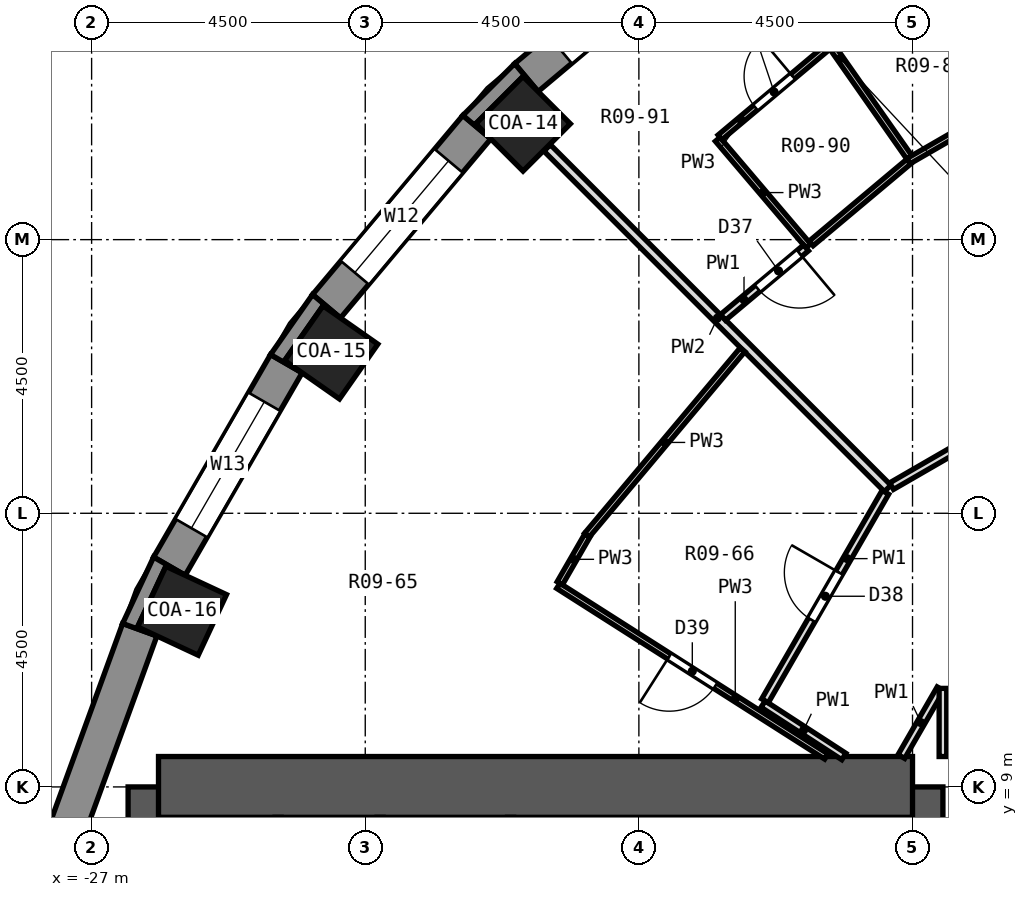
"""IFC4 building model, lengths in metres.
Left out: names, types, materials, properties, quantities, classifications, styles, units other than length and angle.
Written with IfcOpenShell. Run it as: python <this file> out.ifc"""

import sys

from ifc_helpers import new_model, si_unit, direction, frame, frame_2d, origin, origin_2d, place, context, subcontext, project, spatial, polyline, rectangle, outline, extrude, element, fill, save


model = new_model("IFC4")
c1 = context("Model", 3, precision=1e-05, world=origin(), true_north=direction((0.0, 1.0)))
c2 = subcontext(c1, "Body", "Model", "MODEL_VIEW")
j1 = project(units=[si_unit("LENGTHUNIT", "METRE"), si_unit("PLANEANGLEUNIT", "RADIAN")], contexts=[c1])
p1 = place(None, origin())
s1 = spatial("IfcSite", under=j1, at=p1, CompositionType="ELEMENT")
p2 = place(p1, origin())
s2 = spatial("IfcBuilding", under=s1, at=p2, CompositionType="ELEMENT")
p3 = place(p2, frame((0.0, 0.0, 26.3)))
s3 = spatial("IfcBuildingStorey", under=s2, at=p3, CompositionType="ELEMENT", Elevation=26.3)
p4 = place(p3, frame((-19.905, 19.905, 0.0), z_axis=(0.0, 0.0, 1.0), x_axis=(-0.707106781187, 0.707106781187, 0.0)))
e1 = element("IfcColumn", 1, at=p4, inside=s3, PredefinedType="COLUMN", context=c2, shape_type="SweptSolid", body=[
    extrude(rectangle(XDim=1.1, YDim=1.1, at=origin_2d()), origin(), (0.0, 0.0, 1.0), 3.3),
])
p5 = place(p3, frame((-23.059, 16.146, -0.55), z_axis=(0.0, 0.0, 1.0), x_axis=(-0.819152044289, 0.573576436351, 0.0)))
e2 = element("IfcColumn", 2, at=p5, inside=s3, PredefinedType="COLUMN", context=c2, shape_type="SweptSolid", body=[
    extrude(rectangle(XDim=1.1, YDim=1.1, at=origin_2d()), origin(), (0.0, 0.0, 1.0), 3.85),
])
p6 = place(p3, frame((-25.512, 11.897, 0.0), z_axis=(0.0, 0.0, 1.0), x_axis=(-0.906307787037, 0.422618261741, 0.0)))
e3 = element("IfcColumn", 3, at=p6, inside=s3, PredefinedType="COLUMN", context=c2, shape_type="SweptSolid", body=[
    extrude(rectangle(XDim=1.1, YDim=1.1, at=origin_2d()), origin(), (0.0, 0.0, 1.0), 3.3),
])
p7 = place(p3, frame((-13.5, -9.0, 0.0), z_axis=(0.0, 0.0, 1.0), x_axis=(0.0, 1.0, 0.0)))
e4 = element("IfcWall", 4, at=p7, inside=s3, PredefinedType="SHEAR", context=c2, shape_type="SweptSolid", body=[
    extrude(rectangle(XDim=18.0, YDim=1.0, at=frame_2d((9.0, 0.0))), origin(), (0.0, 0.0, 1.0), 3.3),
])
p8 = place(p7, frame((15.4, 0.0, 0.0)))
e5 = element("IfcOpeningElement", 5, at=p8, cuts=e4, PredefinedType="OPENING", context=c2, shape_type="SweptSolid", body=[
    extrude(rectangle(XDim=1.2, YDim=2.1, at=frame_2d((0.6, 1.05))), frame((0.0, 0.512, 0.0), z_axis=(0.0, -1.0, 0.0), x_axis=(1.0, 0.0, 0.0)), (0.0, 0.0, 1.0), 1.024),
])
p9 = place(p7, frame((1.4, 0.0, 0.0)))
e6 = element("IfcOpeningElement", 6, at=p9, cuts=e4, PredefinedType="OPENING", context=c2, shape_type="SweptSolid", body=[
    extrude(rectangle(XDim=1.2, YDim=2.1, at=frame_2d((0.6, 1.05))), frame((0.0, 0.512, 0.0), z_axis=(0.0, -1.0, 0.0), x_axis=(1.0, 0.0, 0.0)), (0.0, 0.0, 1.0), 1.024),
])
p10 = place(p7, frame((7.5, 0.0, 0.0)))
e7 = element("IfcOpeningElement", 7, at=p10, cuts=e4, PredefinedType="OPENING", context=c2, shape_type="SweptSolid", body=[
    extrude(rectangle(XDim=3.0, YDim=2.4, at=frame_2d((1.5, 1.2))), frame((0.0, 0.512, 0.0), z_axis=(0.0, -1.0, 0.0), x_axis=(1.0, 0.0, 0.0)), (0.0, 0.0, 1.0), 1.024),
])
p11 = place(p3, frame((-25.9, -9.0, 0.0), z_axis=(0.0, 0.0, 1.0), x_axis=(0.0, 1.0, 0.0)))
e8 = element("IfcWall", 8, at=p11, inside=s3, PredefinedType="SHEAR", context=c2, shape_type="SweptSolid", body=[
    extrude(rectangle(XDim=18.0, YDim=1.0, at=frame_2d((9.0, 0.0))), origin(), (0.0, 0.0, 1.0), 3.3),
])
p12 = place(p3, frame((-13.5, 9.0, 0.0), z_axis=(0.0, 0.0, 1.0), x_axis=(-1.0, 0.0, 0.0)))
e9 = element("IfcWall", 9, at=p12, inside=s3, PredefinedType="SHEAR", context=c2, shape_type="SweptSolid", body=[
    extrude(rectangle(XDim=12.4, YDim=1.0, at=frame_2d((6.2, 0.0))), origin(), (0.0, 0.0, 1.0), 3.3),
])
p13 = place(p3, frame((-16.904, 23.137, 0.0), z_axis=(0.0, 0.0, 1.0), x_axis=(-0.766026164483, -0.642809392687, 0.0)))
e10 = element("IfcWall", 10, at=p13, inside=s3, PredefinedType="SOLIDWALL", context=c2, shape_type="SweptSolid", body=[
    extrude(rectangle(XDim=3.846, YDim=0.6, at=frame_2d((1.923, 0.0))), origin(), (0.0, 0.0, 1.0), 2.75),
])
p14 = place(p13, frame((0.723, 0.0, 0.9)))
e11 = element("IfcOpeningElement", 11, at=p14, cuts=e10, PredefinedType="OPENING", context=c2, shape_type="SweptSolid", body=[
    extrude(rectangle(XDim=2.4, YDim=1.8, at=frame_2d((1.2, 0.9))), frame((0.0, 0.312, 0.0), z_axis=(0.0, -1.0, 0.0), x_axis=(1.0, 0.0, 0.0)), (0.0, 0.0, 1.0), 0.624),
])
p15 = place(p3, frame((-20.665, 19.85, 0.0), z_axis=(0.0, 0.0, 1.0), x_axis=(-0.642809392687, -0.766026164483, 0.0)))
e12 = element("IfcWall", 12, at=p15, inside=s3, PredefinedType="SOLIDWALL", context=c2, shape_type="SweptSolid", body=[
    extrude(rectangle(XDim=3.846, YDim=0.6, at=frame_2d((1.923, 0.0))), origin(), (0.0, 0.0, 1.0), 2.75),
])
p16 = place(p15, frame((0.723, 0.0, 0.9)))
e13 = element("IfcOpeningElement", 13, at=p16, cuts=e12, PredefinedType="OPENING", context=c2, shape_type="SweptSolid", body=[
    extrude(rectangle(XDim=2.4, YDim=1.8, at=frame_2d((1.2, 0.9))), frame((0.0, 0.312, 0.0), z_axis=(0.0, -1.0, 0.0), x_axis=(1.0, 0.0, 0.0)), (0.0, 0.0, 1.0), 0.624),
])
p17 = place(p3, frame((-23.798, 15.96, 0.0), z_axis=(0.0, 0.0, 1.0), x_axis=(-0.499989888488, -0.86603124159, 0.0)))
e14 = element("IfcWall", 14, at=p17, inside=s3, PredefinedType="SOLIDWALL", context=c2, shape_type="SweptSolid", body=[
    extrude(rectangle(XDim=3.846, YDim=0.6, at=frame_2d((1.923, 0.0))), origin(), (0.0, 0.0, 1.0), 2.75),
])
p18 = place(p17, frame((0.723, 0.0, 0.9)))
e15 = element("IfcOpeningElement", 15, at=p18, cuts=e14, PredefinedType="OPENING", context=c2, shape_type="SweptSolid", body=[
    extrude(rectangle(XDim=2.4, YDim=1.8, at=frame_2d((1.2, 0.9))), frame((0.0, 0.312, 0.0), z_axis=(0.0, -1.0, 0.0), x_axis=(1.0, 0.0, 0.0)), (0.0, 0.0, 1.0), 0.624),
])
p19 = place(p3, frame((-26.208, 11.585, 0.0), z_axis=(0.0, 0.0, 1.0), x_axis=(-0.342028474173, -0.939689588564, 0.0)))
e16 = element("IfcWall", 16, at=p19, inside=s3, PredefinedType="SOLIDWALL", context=c2, shape_type="SweptSolid", body=[
    extrude(rectangle(XDim=3.846, YDim=0.6, at=frame_2d((1.923, 0.0))), origin(), (0.0, 0.0, 1.0), 2.75),
])
p20 = place(p3, origin())
e17 = element("IfcWall", 17, at=p20, inside=s3, PredefinedType="SOLIDWALL", context=c2, shape_type="SweptSolid", body=[
    extrude(outline(polyline([(-20.895, 20.043), (-20.435, 19.657), (-20.683, 19.905), (-19.905, 20.683), (-19.657, 20.435), (-20.043, 20.895), (-20.895, 20.043)])), origin(), (0.0, 0.0, 1.0), 2.75),
])
p21 = place(p3, origin())
e18 = element("IfcWall", 18, at=p21, inside=s3, PredefinedType="SOLIDWALL", context=c2, shape_type="SweptSolid", body=[
    extrude(outline(polyline([(-23.367, 17.097), (-24.058, 16.11), (-23.538, 15.81), (-23.825, 16.011), (-23.194, 16.912), (-22.907, 16.711), (-23.367, 17.097)])), origin(), (0.0, 0.0, 1.0), 2.75),
])
p22 = place(p3, origin())
e19 = element("IfcWall", 19, at=p22, inside=s3, PredefinedType="SOLIDWALL", context=c2, shape_type="SweptSolid", body=[
    extrude(outline(polyline([(-26.49, 11.688), (-25.926, 11.483), (-26.243, 11.631), (-25.779, 12.628), (-25.461, 12.479), (-25.981, 12.78), (-26.49, 11.688)])), origin(), (0.0, 0.0, 1.0), 2.75),
])
p23 = place(p3, frame((-15.825, 22.6, 0.0), z_axis=(0.0, 0.0, 1.0), x_axis=(0.573420971208, -0.819260880171, 0.0)))
e20 = element("IfcWall", 20, at=p23, inside=s3, PredefinedType="PARTITIONING", context=c2, shape_type="SweptSolid", body=[
    extrude(rectangle(XDim=3.96, YDim=0.1, at=frame_2d((1.98, 0.0))), origin(), (0.0, 0.0, 1.0), 2.75),
])
p24 = place(p3, frame((-16.704, 19.65, 0.0), z_axis=(0.0, 0.0, 1.0), x_axis=(0.647857930374, -0.761761184395, 0.0)))
e21 = element("IfcWall", 21, at=p24, inside=s3, PredefinedType="PARTITIONING", context=c2, shape_type="SweptSolid", body=[
    extrude(rectangle(XDim=2.3, YDim=0.1, at=frame_2d((1.15, 0.0))), origin(), (0.0, 0.0, 1.0), 2.75),
])
p25 = place(p3, frame((-19.509, 19.509, 0.0), z_axis=(0.0, 0.0, 1.0), x_axis=(0.707106781187, -0.707106781187, 0.0)))
e22 = element("IfcWall", 22, at=p25, inside=s3, PredefinedType="PARTITIONING", context=c2, shape_type="SweptSolid", body=[
    extrude(rectangle(XDim=7.92, YDim=0.15, at=frame_2d((3.96, 0.0))), origin(), (0.0, 0.0, 1.0), 2.75),
])
p26 = place(p3, frame((-15.957, 10.362, 0.0), z_axis=(0.0, 0.0, 1.0), x_axis=(0.838795721465, -0.544446267002, 0.0)))
e23 = element("IfcWall", 23, at=p26, inside=s3, PredefinedType="PARTITIONING", context=c2, shape_type="SweptSolid", body=[
    extrude(rectangle(XDim=1.583, YDim=0.125, at=frame_2d((0.792, 0.0))), origin(), (0.0, 0.0, 1.0), 2.75),
])
p27 = place(p3, frame((-19.325, 12.307, 0.0), z_axis=(0.0, 0.0, 1.0), x_axis=(0.843449781198, -0.537208029163, 0.0)))
e24 = element("IfcWall", 24, at=p27, inside=s3, PredefinedType="PARTITIONING", context=c2, shape_type="SweptSolid", body=[
    extrude(rectangle(XDim=5.225, YDim=0.1, at=frame_2d((2.612, 0.0))), origin(), (0.0, 0.0, 1.0), 2.75),
])
p28 = place(p27, frame((2.163, 0.0, 0.0)))
e25 = element("IfcOpeningElement", 25, at=p28, cuts=e24, PredefinedType="OPENING", context=c2, shape_type="SweptSolid", body=[
    extrude(rectangle(XDim=0.9, YDim=2.1, at=frame_2d((0.45, 1.05))), frame((0.0, 0.062, 0.0), z_axis=(0.0, -1.0, 0.0), x_axis=(1.0, 0.0, 0.0)), (0.0, 0.0, 1.0), 0.124),
])
p29 = place(p3, frame((-13.844, 13.947, 0.0), z_axis=(0.0, 0.0, 1.0), x_axis=(0.866031375826, 0.499989655977, 0.0)))
e26 = element("IfcWall", 26, at=p29, inside=s3, PredefinedType="PARTITIONING", context=c2, shape_type="SweptSolid", body=[
    extrude(rectangle(XDim=10.045, YDim=0.125, at=frame_2d((5.022, 0.0))), origin(), (0.0, 0.0, 1.0), 2.75),
])
p30 = place(p29, frame((3.674, 0.0, 0.0)))
e27 = element("IfcOpeningElement", 27, at=p30, cuts=e26, PredefinedType="OPENING", context=c2, shape_type="SweptSolid", body=[
    extrude(rectangle(XDim=1.0, YDim=2.1, at=frame_2d((0.5, 1.05))), frame((0.0, 0.074, 0.0), z_axis=(0.0, -1.0, 0.0), x_axis=(1.0, 0.0, 0.0)), (0.0, 0.0, 1.0), 0.149),
])
p31 = place(p3, frame((-13.569, 19.29, 0.0), z_axis=(0.0, 0.0, 1.0), x_axis=(0.865946011253, 0.500137486693, 0.0)))
e28 = element("IfcWall", 28, at=p31, inside=s3, PredefinedType="PARTITIONING", context=c2, shape_type="SweptSolid", body=[
    extrude(rectangle(XDim=2.207, YDim=0.1, at=frame_2d((1.103, 0.0))), origin(), (0.0, 0.0, 1.0), 2.75),
])
p32 = place(p3, frame((-16.616, 16.722, 0.0), z_axis=(0.0, 0.0, 1.0), x_axis=(0.766814187789, 0.641869146638, 0.0)))
e29 = element("IfcWall", 29, at=p32, inside=s3, PredefinedType="PARTITIONING", context=c2, shape_type="SweptSolid", body=[
    extrude(rectangle(XDim=1.78, YDim=0.125, at=frame_2d((0.89, 0.0))), origin(), (0.0, 0.0, 1.0), 2.75),
])
p33 = place(p32, frame((0.74, 0.0, 0.0)))
e30 = element("IfcOpeningElement", 30, at=p33, cuts=e29, PredefinedType="OPENING", context=c2, shape_type="SweptSolid", body=[
    extrude(rectangle(XDim=0.9, YDim=2.1, at=frame_2d((0.45, 1.05))), frame((0.0, 0.074, 0.0), z_axis=(0.0, -1.0, 0.0), x_axis=(1.0, 0.0, 0.0)), (0.0, 0.0, 1.0), 0.149),
])
p34 = place(p3, frame((-15.166, 17.938, 0.0), z_axis=(0.0, 0.0, 1.0), x_axis=(0.766084035901, 0.642740421895, 0.0)))
e31 = element("IfcWall", 31, at=p34, inside=s3, PredefinedType="PARTITIONING", context=c2, shape_type="SweptSolid", body=[
    extrude(rectangle(XDim=2.092, YDim=0.1, at=frame_2d((1.046, 0.0))), origin(), (0.0, 0.0, 1.0), 2.75),
])
p35 = place(p3, frame((-16.666, 19.682, 0.0), z_axis=(0.0, 0.0, 1.0), x_axis=(0.766191543126, 0.642612261976, 0.0)))
e32 = element("IfcWall", 32, at=p35, inside=s3, PredefinedType="PARTITIONING", context=c2, shape_type="SweptSolid", body=[
    extrude(rectangle(XDim=2.321, YDim=0.1, at=frame_2d((1.161, 0.0))), origin(), (0.0, 0.0, 1.0), 2.75),
])
p36 = place(p35, frame((0.76, 0.0, 0.0)))
e33 = element("IfcOpeningElement", 33, at=p36, cuts=e32, PredefinedType="OPENING", context=c2, shape_type="SweptSolid", body=[
    extrude(rectangle(XDim=0.8, YDim=2.1, at=frame_2d((0.4, 1.05))), frame((0.0, 0.062, 0.0), z_axis=(0.0, -1.0, 0.0), x_axis=(1.0, 0.0, 0.0)), (0.0, 0.0, 1.0), 0.124),
])
p37 = place(p3, frame((-18.855, 13.14, 0.0), z_axis=(0.0, 0.0, 1.0), x_axis=(0.642918792106, 0.765934348856, 0.0)))
e34 = element("IfcWall", 34, at=p37, inside=s3, PredefinedType="PARTITIONING", context=c2, shape_type="SweptSolid", body=[
    extrude(rectangle(XDim=3.981, YDim=0.1, at=frame_2d((1.991, 0.0))), origin(), (0.0, 0.0, 1.0), 2.75),
])
p38 = place(p3, frame((-13.683, 9.5, 0.0), z_axis=(0.0, 0.0, 1.0), x_axis=(0.500018234033, 0.866014876105, 0.0)))
e35 = element("IfcWall", 35, at=p38, inside=s3, PredefinedType="PARTITIONING", context=c2, shape_type="SweptSolid", body=[
    extrude(rectangle(XDim=1.286, YDim=0.125, at=frame_2d((0.643, 0.0))), origin(), (0.0, 0.0, 1.0), 2.75),
])
p39 = place(p3, frame((-15.926, 10.416, 0.0), z_axis=(0.0, 0.0, 1.0), x_axis=(0.500019653581, 0.866014056487, 0.0)))
e36 = element("IfcWall", 36, at=p39, inside=s3, PredefinedType="PARTITIONING", context=c2, shape_type="SweptSolid", body=[
    extrude(rectangle(XDim=3.958, YDim=0.125, at=frame_2d((1.979, 0.0))), origin(), (0.0, 0.0, 1.0), 2.75),
])
p40 = place(p39, frame((1.535, 0.0, 0.0)))
e37 = element("IfcOpeningElement", 37, at=p40, cuts=e36, PredefinedType="OPENING", context=c2, shape_type="SweptSolid", body=[
    extrude(rectangle(XDim=0.9, YDim=2.1, at=frame_2d((0.45, 1.05))), frame((0.0, 0.074, 0.0), z_axis=(0.0, -1.0, 0.0), x_axis=(1.0, 0.0, 0.0)), (0.0, 0.0, 1.0), 0.149),
])
p41 = place(p3, frame((-19.3, 12.35, 0.0), z_axis=(0.0, 0.0, 1.0), x_axis=(0.499730223204, 0.866181103474, 0.0)))
e38 = element("IfcWall", 38, at=p41, inside=s3, PredefinedType="PARTITIONING", context=c2, shape_type="SweptSolid", body=[
    extrude(rectangle(XDim=0.907, YDim=0.1, at=frame_2d((0.453, 0.0))), origin(), (0.0, 0.0, 1.0), 2.75),
])
p42 = place(p3, frame((-13.0, 9.5, 0.0), z_axis=(0.0, 0.0, 1.0), x_axis=(0.0, 1.0, 0.0)))
e39 = element("IfcWall", 39, at=p42, inside=s3, PredefinedType="PARTITIONING", context=c2, shape_type="SweptSolid", body=[
    extrude(rectangle(XDim=1.121, YDim=0.125, at=frame_2d((0.56, 0.0))), origin(), (0.0, 0.0, 1.0), 2.75),
])
p43 = place(p3, frame((-20.11, 5.3, 0.0), z_axis=(0.0, 0.0, 1.0), x_axis=(0.0, 1.0, 0.0)))
e40 = element("IfcWall", 40, at=p43, inside=s3, PredefinedType="PARTITIONING", context=c2, shape_type="SweptSolid", body=[
    extrude(rectangle(XDim=3.2, YDim=0.1, at=frame_2d((1.6, 0.0))), origin(), (0.0, 0.0, 1.0), 2.75),
])
p44 = place(p3, frame((-22.256, 5.3, 0.0), z_axis=(0.0, 0.0, 1.0), x_axis=(0.0, 1.0, 0.0)))
e41 = element("IfcWall", 41, at=p44, inside=s3, PredefinedType="PARTITIONING", context=c2, shape_type="SweptSolid", body=[
    extrude(rectangle(XDim=3.2, YDim=0.1, at=frame_2d((1.6, 0.0))), origin(), (0.0, 0.0, 1.0), 2.75),
])
p45 = place(p44, frame((1.15, 0.0, 0.0)))
e42 = element("IfcOpeningElement", 42, at=p45, cuts=e41, PredefinedType="OPENING", context=c2, shape_type="SweptSolid", body=[
    extrude(rectangle(XDim=0.9, YDim=2.1, at=frame_2d((0.45, 1.05))), frame((0.0, 0.062, 0.0), z_axis=(0.0, -1.0, 0.0), x_axis=(1.0, 0.0, 0.0)), (0.0, 0.0, 1.0), 0.124),
])
p46 = place(p3, frame((-23.933, 5.3, 0.0), z_axis=(0.0, 0.0, 1.0), x_axis=(0.0, 1.0, 0.0)))
e43 = element("IfcWall", 43, at=p46, inside=s3, PredefinedType="PARTITIONING", context=c2, shape_type="SweptSolid", body=[
    extrude(rectangle(XDim=3.2, YDim=0.1, at=frame_2d((1.6, 0.0))), origin(), (0.0, 0.0, 1.0), 2.75),
])
p47 = place(p46, frame((1.15, 0.0, 0.0)))
e44 = element("IfcOpeningElement", 44, at=p47, cuts=e43, PredefinedType="OPENING", context=c2, shape_type="SweptSolid", body=[
    extrude(rectangle(XDim=0.9, YDim=2.1, at=frame_2d((0.45, 1.05))), frame((0.0, 0.062, 0.0), z_axis=(0.0, -1.0, 0.0), x_axis=(1.0, 0.0, 0.0)), (0.0, 0.0, 1.0), 0.124),
])
p48 = place(p14, origin())
e45 = element("IfcWindow", 45, at=p48, inside=s3, PartitioningType="SINGLE_PANEL", PredefinedType="WINDOW", context=c2, shape_type="SweptSolid", body=[
    extrude(rectangle(XDim=2.4, YDim=1.8, at=frame_2d((1.2, 0.9))), frame((0.0, 0.18, 0.0), z_axis=(0.0, -1.0, 0.0), x_axis=(1.0, 0.0, 0.0)), (0.0, 0.0, 1.0), 0.06),
])
fill(e11, e45)
p49 = place(p16, origin())
e46 = element("IfcWindow", 46, at=p49, inside=s3, PartitioningType="SINGLE_PANEL", PredefinedType="WINDOW", context=c2, shape_type="SweptSolid", body=[
    extrude(rectangle(XDim=2.4, YDim=1.8, at=frame_2d((1.2, 0.9))), frame((0.0, 0.18, 0.0), z_axis=(0.0, -1.0, 0.0), x_axis=(1.0, 0.0, 0.0)), (0.0, 0.0, 1.0), 0.06),
])
fill(e13, e46)
p50 = place(p18, origin())
e47 = element("IfcWindow", 47, at=p50, inside=s3, PartitioningType="SINGLE_PANEL", PredefinedType="WINDOW", context=c2, shape_type="SweptSolid", body=[
    extrude(rectangle(XDim=2.4, YDim=1.8, at=frame_2d((1.2, 0.9))), frame((0.0, 0.18, 0.0), z_axis=(0.0, -1.0, 0.0), x_axis=(1.0, 0.0, 0.0)), (0.0, 0.0, 1.0), 0.06),
])
fill(e15, e47)
p51 = place(p36, origin())
e48 = element("IfcDoor", 48, at=p51, inside=s3, OperationType="SINGLE_SWING_RIGHT", PredefinedType="DOOR", context=c2, shape_type="SweptSolid", body=[
    extrude(rectangle(XDim=0.8, YDim=2.1, at=frame_2d((0.4, 1.05))), frame((0.0, 0.025, 0.0), z_axis=(0.0, -1.0, 0.0), x_axis=(1.0, 0.0, 0.0)), (0.0, 0.0, 1.0), 0.05),
])
fill(e33, e48)
p52 = place(p33, frame((0.9, 0.0, 0.0), z_axis=(0.0, 0.0, 1.0), x_axis=(-1.0, 0.0, 0.0)))
e49 = element("IfcDoor", 49, at=p52, inside=s3, OperationType="SINGLE_SWING_LEFT", PredefinedType="DOOR", context=c2, shape_type="SweptSolid", body=[
    extrude(rectangle(XDim=0.9, YDim=2.1, at=frame_2d((0.45, 1.05))), frame((0.0, 0.025, 0.0), z_axis=(0.0, -1.0, 0.0), x_axis=(1.0, 0.0, 0.0)), (0.0, 0.0, 1.0), 0.05),
])
fill(e30, e49)
p53 = place(p40, origin())
e50 = element("IfcDoor", 50, at=p53, inside=s3, OperationType="SINGLE_SWING_RIGHT", PredefinedType="DOOR", context=c2, shape_type="SweptSolid", body=[
    extrude(rectangle(XDim=0.9, YDim=2.1, at=frame_2d((0.45, 1.05))), frame((0.0, 0.025, 0.0), z_axis=(0.0, -1.0, 0.0), x_axis=(1.0, 0.0, 0.0)), (0.0, 0.0, 1.0), 0.05),
])
fill(e37, e50)
p54 = place(p28, frame((0.9, 0.0, 0.0), z_axis=(0.0, 0.0, 1.0), x_axis=(-1.0, 0.0, 0.0)))
e51 = element("IfcDoor", 51, at=p54, inside=s3, OperationType="SINGLE_SWING_RIGHT", PredefinedType="DOOR", context=c2, shape_type="SweptSolid", body=[
    extrude(rectangle(XDim=0.9, YDim=2.1, at=frame_2d((0.45, 1.05))), frame((0.0, 0.025, 0.0), z_axis=(0.0, -1.0, 0.0), x_axis=(1.0, 0.0, 0.0)), (0.0, 0.0, 1.0), 0.05),
])
fill(e25, e51)
save(model, sys.argv[1])
